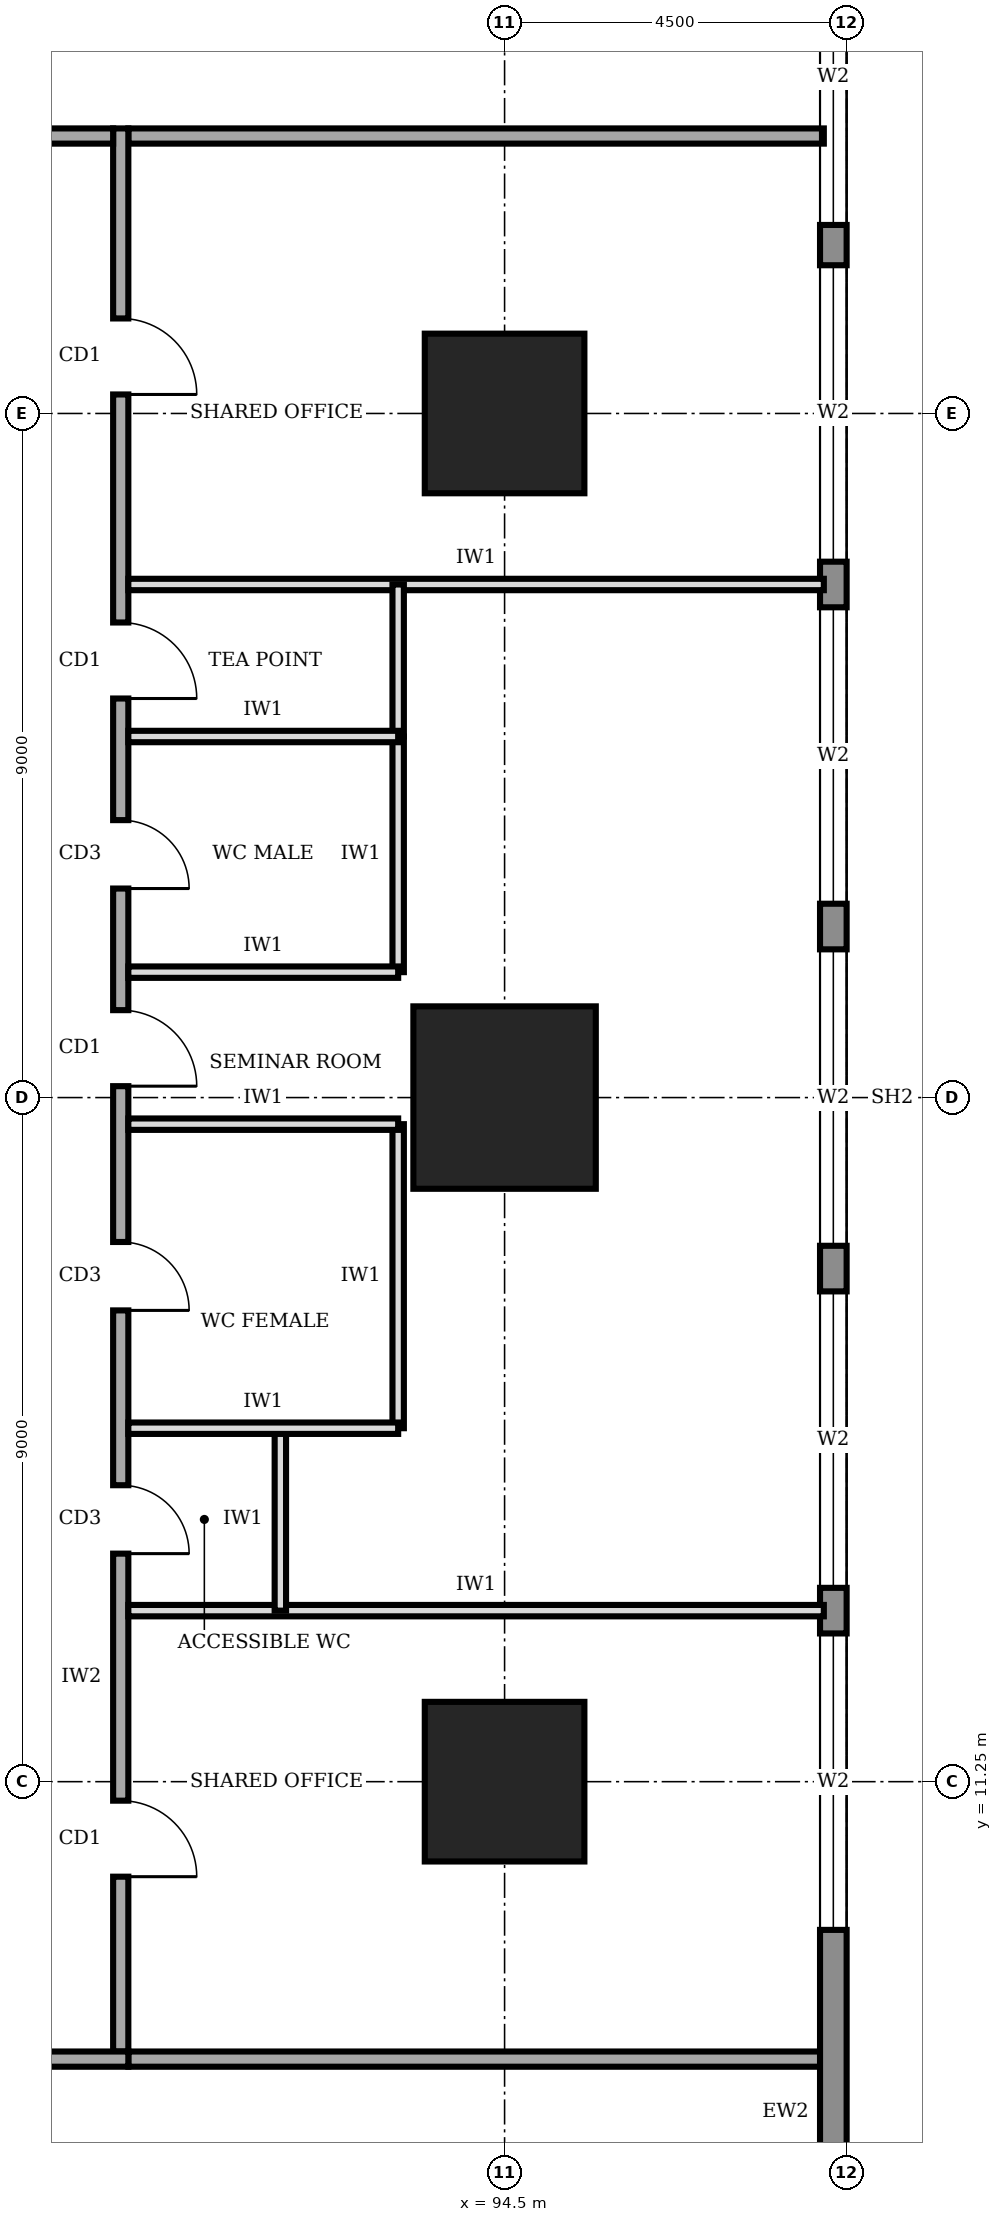
"""IFC4 building model, lengths in metres.
Left out: names, types, materials, properties, quantities, classifications, styles, units other than length and angle.
Written with IfcOpenShell. Run it as: python <this file> out.ifc"""

import sys

from ifc_helpers import new_model, si_unit, direction, frame, frame_2d, origin, origin_2d, place, context, subcontext, project, spatial, rectangle, extrude, element, fill, save


model = new_model("IFC4")
c1 = context("Model", 3, precision=1e-05, world=origin(), true_north=direction((0.0, 1.0)))
c2 = subcontext(c1, "Body", "Model", "MODEL_VIEW")
j1 = project(units=[si_unit("LENGTHUNIT", "METRE"), si_unit("PLANEANGLEUNIT", "RADIAN")], contexts=[c1])
p1 = place(None, origin())
s1 = spatial("IfcSite", under=j1, at=p1, CompositionType="ELEMENT")
p2 = place(p1, origin())
s2 = spatial("IfcBuilding", under=s1, at=p2, CompositionType="ELEMENT")
p3 = place(p2, frame((0.0, 0.0, 69.0)))
s3 = spatial("IfcBuildingStorey", under=s2, at=p3, CompositionType="ELEMENT", Elevation=69.0)
p4 = place(p3, frame((94.5, 11.25, 0.0), z_axis=(0.0, 0.0, 1.0), x_axis=(1.0, 0.0, 0.0)))
e1 = element("IfcColumn", 1, at=p4, inside=s3, PredefinedType="COLUMN", context=c2, shape_type="SweptSolid", body=[
    extrude(rectangle(XDim=2.1, YDim=2.1, at=origin_2d()), origin(), (0.0, 0.0, 1.0), 4.0),
])
p5 = place(p3, frame((94.5, 20.25, 0.0), z_axis=(0.0, 0.0, 1.0), x_axis=(1.0, 0.0, 0.0)))
e2 = element("IfcColumn", 2, at=p5, inside=s3, PredefinedType="COLUMN", context=c2, shape_type="SweptSolid", body=[
    extrude(rectangle(XDim=2.4, YDim=2.4, at=origin_2d()), origin(), (0.0, 0.0, 1.0), 4.0),
])
p6 = place(p3, frame((94.5, 29.25, 0.0), z_axis=(0.0, 0.0, 1.0), x_axis=(1.0, 0.0, 0.0)))
e3 = element("IfcColumn", 3, at=p6, inside=s3, PredefinedType="COLUMN", context=c2, shape_type="SweptSolid", body=[
    extrude(rectangle(XDim=2.1, YDim=2.1, at=origin_2d()), origin(), (0.0, 0.0, 1.0), 4.0),
])
p7 = place(p3, frame((98.825, 4.52, 0.0), z_axis=(0.0, 0.0, 1.0), x_axis=(0.0, 1.0, 0.0)))
e4 = element("IfcWall", 4, at=p7, inside=s3, PredefinedType="STANDARD", context=c2, shape_type="SweptSolid", body=[
    extrude(rectangle(XDim=31.46, YDim=0.35, at=frame_2d((15.73, 0.0))), origin(), (0.0, 0.0, 1.0), 3.75),
])
p8 = place(p7, frame((4.78, 0.0, 0.6)))
e5 = element("IfcOpeningElement", 5, at=p8, cuts=e4, PredefinedType="OPENING", context=c2, shape_type="SweptSolid", body=[
    extrude(rectangle(XDim=3.9, YDim=2.6, at=frame_2d((1.95, 1.3))), frame((0.0, 0.185, 0.0), z_axis=(0.0, -1.0, 0.0), x_axis=(1.0, 0.0, 0.0)), (0.0, 0.0, 1.0), 0.37),
])
p9 = place(p7, frame((9.28, 0.0, 0.6)))
e6 = element("IfcOpeningElement", 6, at=p9, cuts=e4, PredefinedType="OPENING", context=c2, shape_type="SweptSolid", body=[
    extrude(rectangle(XDim=3.9, YDim=2.6, at=frame_2d((1.95, 1.3))), frame((0.0, 0.185, 0.0), z_axis=(0.0, -1.0, 0.0), x_axis=(1.0, 0.0, 0.0)), (0.0, 0.0, 1.0), 0.37),
])
p10 = place(p7, frame((13.78, 0.0, 0.6)))
e7 = element("IfcOpeningElement", 7, at=p10, cuts=e4, PredefinedType="OPENING", context=c2, shape_type="SweptSolid", body=[
    extrude(rectangle(XDim=3.9, YDim=2.6, at=frame_2d((1.95, 1.3))), frame((0.0, 0.185, 0.0), z_axis=(0.0, -1.0, 0.0), x_axis=(1.0, 0.0, 0.0)), (0.0, 0.0, 1.0), 0.37),
])
p11 = place(p7, frame((18.28, 0.0, 0.6)))
e8 = element("IfcOpeningElement", 8, at=p11, cuts=e4, PredefinedType="OPENING", context=c2, shape_type="SweptSolid", body=[
    extrude(rectangle(XDim=3.9, YDim=2.6, at=frame_2d((1.95, 1.3))), frame((0.0, 0.185, 0.0), z_axis=(0.0, -1.0, 0.0), x_axis=(1.0, 0.0, 0.0)), (0.0, 0.0, 1.0), 0.37),
])
p12 = place(p7, frame((22.78, 0.0, 0.6)))
e9 = element("IfcOpeningElement", 9, at=p12, cuts=e4, PredefinedType="OPENING", context=c2, shape_type="SweptSolid", body=[
    extrude(rectangle(XDim=3.9, YDim=2.6, at=frame_2d((1.95, 1.3))), frame((0.0, 0.185, 0.0), z_axis=(0.0, -1.0, 0.0), x_axis=(1.0, 0.0, 0.0)), (0.0, 0.0, 1.0), 0.37),
])
p13 = place(p7, frame((27.21, 0.0, 0.6)))
e10 = element("IfcOpeningElement", 10, at=p13, cuts=e4, PredefinedType="OPENING", context=c2, shape_type="SweptSolid", body=[
    extrude(rectangle(XDim=3.9, YDim=2.6, at=frame_2d((1.95, 1.3))), frame((0.0, 0.185, 0.0), z_axis=(0.0, -1.0, 0.0), x_axis=(1.0, 0.0, 0.0)), (0.0, 0.0, 1.0), 0.37),
])
p14 = place(p3, frame((72.65, 7.6, 0.0), z_axis=(0.0, 0.0, 1.0), x_axis=(1.0, 0.0, 0.0)))
e11 = element("IfcWall", 11, at=p14, inside=s3, PredefinedType="SOLIDWALL", context=c2, shape_type="SweptSolid", body=[
    extrude(rectangle(XDim=16.9, YDim=0.2, at=frame_2d((8.45, 0.0))), origin(), (0.0, 0.0, 1.0), 3.75),
])
p15 = place(p14, frame((3.175, 0.0, 0.0)))
e12 = element("IfcOpeningElement", 12, at=p15, cuts=e11, PredefinedType="OPENING", context=c2, shape_type="SweptSolid", body=[
    extrude(rectangle(XDim=1.8, YDim=2.1, at=frame_2d((0.9, 1.05))), frame((0.0, 0.11, 0.0), z_axis=(0.0, -1.0, 0.0), x_axis=(1.0, 0.0, 0.0)), (0.0, 0.0, 1.0), 0.22),
])
p16 = place(p14, frame((10.1, 0.0, 0.0)))
e13 = element("IfcOpeningElement", 13, at=p16, cuts=e11, PredefinedType="OPENING", context=c2, shape_type="SweptSolid", body=[
    extrude(rectangle(XDim=1.0, YDim=2.1, at=frame_2d((0.5, 1.05))), frame((0.0, 0.11, 0.0), z_axis=(0.0, -1.0, 0.0), x_axis=(1.0, 0.0, 0.0)), (0.0, 0.0, 1.0), 0.22),
])
p17 = place(p14, frame((14.375, 0.0, 0.0)))
e14 = element("IfcOpeningElement", 14, at=p17, cuts=e11, PredefinedType="OPENING", context=c2, shape_type="SweptSolid", body=[
    extrude(rectangle(XDim=1.0, YDim=2.1, at=frame_2d((0.5, 1.05))), frame((0.0, 0.11, 0.0), z_axis=(0.0, -1.0, 0.0), x_axis=(1.0, 0.0, 0.0)), (0.0, 0.0, 1.0), 0.22),
])
p18 = place(p3, frame((89.45, 7.7, 0.0), z_axis=(0.0, 0.0, 1.0), x_axis=(0.0, 1.0, 0.0)))
e15 = element("IfcWall", 15, at=p18, inside=s3, PredefinedType="SOLIDWALL", context=c2, shape_type="SweptSolid", body=[
    extrude(rectangle(XDim=25.3, YDim=0.2, at=frame_2d((12.65, 0.0))), origin(), (0.0, 0.0, 1.0), 3.75),
])
p19 = place(p18, frame((2.3, 0.0, 0.0)))
e16 = element("IfcOpeningElement", 16, at=p19, cuts=e15, PredefinedType="OPENING", context=c2, shape_type="SweptSolid", body=[
    extrude(rectangle(XDim=1.0, YDim=2.1, at=frame_2d((0.5, 1.05))), frame((0.0, 0.11, 0.0), z_axis=(0.0, -1.0, 0.0), x_axis=(1.0, 0.0, 0.0)), (0.0, 0.0, 1.0), 0.22),
])
p20 = place(p18, frame((6.55, 0.0, 0.0)))
e17 = element("IfcOpeningElement", 17, at=p20, cuts=e15, PredefinedType="OPENING", context=c2, shape_type="SweptSolid", body=[
    extrude(rectangle(XDim=0.9, YDim=2.1, at=frame_2d((0.45, 1.05))), frame((0.0, 0.11, 0.0), z_axis=(0.0, -1.0, 0.0), x_axis=(1.0, 0.0, 0.0)), (0.0, 0.0, 1.0), 0.22),
])
p21 = place(p18, frame((9.75, 0.0, 0.0)))
e18 = element("IfcOpeningElement", 18, at=p21, cuts=e15, PredefinedType="OPENING", context=c2, shape_type="SweptSolid", body=[
    extrude(rectangle(XDim=0.9, YDim=2.1, at=frame_2d((0.45, 1.05))), frame((0.0, 0.11, 0.0), z_axis=(0.0, -1.0, 0.0), x_axis=(1.0, 0.0, 0.0)), (0.0, 0.0, 1.0), 0.22),
])
p22 = place(p18, frame((15.3, 0.0, 0.0)))
e19 = element("IfcOpeningElement", 19, at=p22, cuts=e15, PredefinedType="OPENING", context=c2, shape_type="SweptSolid", body=[
    extrude(rectangle(XDim=0.9, YDim=2.1, at=frame_2d((0.45, 1.05))), frame((0.0, 0.11, 0.0), z_axis=(0.0, -1.0, 0.0), x_axis=(1.0, 0.0, 0.0)), (0.0, 0.0, 1.0), 0.22),
])
p23 = place(p18, frame((17.8, 0.0, 0.0)))
e20 = element("IfcOpeningElement", 20, at=p23, cuts=e15, PredefinedType="OPENING", context=c2, shape_type="SweptSolid", body=[
    extrude(rectangle(XDim=1.0, YDim=2.1, at=frame_2d((0.5, 1.05))), frame((0.0, 0.11, 0.0), z_axis=(0.0, -1.0, 0.0), x_axis=(1.0, 0.0, 0.0)), (0.0, 0.0, 1.0), 0.22),
])
p24 = place(p18, frame((12.7, 0.0, 0.0)))
e21 = element("IfcOpeningElement", 21, at=p24, cuts=e15, PredefinedType="OPENING", context=c2, shape_type="SweptSolid", body=[
    extrude(rectangle(XDim=1.0, YDim=2.1, at=frame_2d((0.5, 1.05))), frame((0.0, 0.11, 0.0), z_axis=(0.0, -1.0, 0.0), x_axis=(1.0, 0.0, 0.0)), (0.0, 0.0, 1.0), 0.22),
])
p25 = place(p18, frame((21.8, 0.0, 0.0)))
e22 = element("IfcOpeningElement", 22, at=p25, cuts=e15, PredefinedType="OPENING", context=c2, shape_type="SweptSolid", body=[
    extrude(rectangle(XDim=1.0, YDim=2.1, at=frame_2d((0.5, 1.05))), frame((0.0, 0.11, 0.0), z_axis=(0.0, -1.0, 0.0), x_axis=(1.0, 0.0, 0.0)), (0.0, 0.0, 1.0), 0.22),
])
p26 = place(p3, frame((89.35, 32.9, 0.0), z_axis=(0.0, 0.0, 1.0), x_axis=(-1.0, 0.0, 0.0)))
e23 = element("IfcWall", 23, at=p26, inside=s3, PredefinedType="SOLIDWALL", context=c2, shape_type="SweptSolid", body=[
    extrude(rectangle(XDim=16.9, YDim=0.2, at=frame_2d((8.45, 0.0))), origin(), (0.0, 0.0, 1.0), 3.75),
])
p27 = place(p26, frame((14.375, 0.0, 0.0)))
e24 = element("IfcOpeningElement", 24, at=p27, cuts=e23, PredefinedType="OPENING", context=c2, shape_type="SweptSolid", body=[
    extrude(rectangle(XDim=1.0, YDim=2.1, at=frame_2d((0.5, 1.05))), frame((0.0, 0.11, 0.0), z_axis=(0.0, -1.0, 0.0), x_axis=(1.0, 0.0, 0.0)), (0.0, 0.0, 1.0), 0.22),
])
p28 = place(p26, frame((7.85, 0.0, 0.0)))
e25 = element("IfcOpeningElement", 25, at=p28, cuts=e23, PredefinedType="OPENING", context=c2, shape_type="SweptSolid", body=[
    extrude(rectangle(XDim=1.0, YDim=2.1, at=frame_2d((0.5, 1.05))), frame((0.0, 0.11, 0.0), z_axis=(0.0, -1.0, 0.0), x_axis=(1.0, 0.0, 0.0)), (0.0, 0.0, 1.0), 0.22),
])
p29 = place(p26, frame((1.325, 0.0, 0.0)))
e26 = element("IfcOpeningElement", 26, at=p29, cuts=e23, PredefinedType="OPENING", context=c2, shape_type="SweptSolid", body=[
    extrude(rectangle(XDim=1.0, YDim=2.1, at=frame_2d((0.5, 1.05))), frame((0.0, 0.11, 0.0), z_axis=(0.0, -1.0, 0.0), x_axis=(1.0, 0.0, 0.0)), (0.0, 0.0, 1.0), 0.22),
])
for number, where, z_axis, x_axis in (
    (27, (89.55, 7.6, 0.0), (0.0, 0.0, 1.0), (1.0, 0.0, 0.0)),
    (28, (89.55, 32.9, 0.0), (0.0, 0.0, 1.0), (1.0, 0.0, 0.0)),
):
    element("IfcWall", number, at=place(p3, frame(where, z_axis=z_axis, x_axis=x_axis)), inside=s3, PredefinedType="SOLIDWALL", context=c2, shape_type="SweptSolid", body=[
        extrude(rectangle(XDim=9.15, YDim=0.2, at=frame_2d((4.575, 0.0))), origin(), (0.0, 0.0, 1.0), 3.75),
    ])
for number, where, z_axis, x_axis in (
    (29, (89.55, 13.5, 0.0), (0.0, 0.0, 1.0), (1.0, 0.0, 0.0)),
    (30, (89.55, 27.0, 0.0), (0.0, 0.0, 1.0), (1.0, 0.0, 0.0)),
):
    element("IfcWall", number, at=place(p3, frame(where, z_axis=z_axis, x_axis=x_axis)), inside=s3, PredefinedType="PARTITIONING", context=c2, shape_type="SweptSolid", body=[
        extrude(rectangle(XDim=9.15, YDim=0.15, at=frame_2d((4.575, 0.0))), origin(), (0.0, 0.0, 1.0), 3.75),
    ])
p30 = place(p3, frame((89.55, 15.9, 0.0), z_axis=(0.0, 0.0, 1.0), x_axis=(1.0, 0.0, 0.0)))
e31 = element("IfcWall", 31, at=p30, inside=s3, PredefinedType="PARTITIONING", context=c2, shape_type="SweptSolid", body=[
    extrude(rectangle(XDim=3.55, YDim=0.15, at=frame_2d((1.775, 0.0))), origin(), (0.0, 0.0, 1.0), 3.75),
])
p31 = place(p3, frame((89.55, 19.9, 0.0), z_axis=(0.0, 0.0, 1.0), x_axis=(1.0, 0.0, 0.0)))
e32 = element("IfcWall", 32, at=p31, inside=s3, PredefinedType="PARTITIONING", context=c2, shape_type="SweptSolid", body=[
    extrude(rectangle(XDim=3.55, YDim=0.15, at=frame_2d((1.775, 0.0))), origin(), (0.0, 0.0, 1.0), 2.85),
])
for number, where, z_axis, x_axis in (
    (33, (89.55, 21.9, 0.0), (0.0, 0.0, 1.0), (1.0, 0.0, 0.0)),
    (34, (89.55, 25.0, 0.0), (0.0, 0.0, 1.0), (1.0, 0.0, 0.0)),
):
    element("IfcWall", number, at=place(p3, frame(where, z_axis=z_axis, x_axis=x_axis)), inside=s3, PredefinedType="PARTITIONING", context=c2, shape_type="SweptSolid", body=[
        extrude(rectangle(XDim=3.55, YDim=0.15, at=frame_2d((1.775, 0.0))), origin(), (0.0, 0.0, 1.0), 3.75),
    ])
p32 = place(p3, frame((91.55, 13.5, 0.0), z_axis=(0.0, 0.0, 1.0), x_axis=(0.0, 1.0, 0.0)))
e35 = element("IfcWall", 35, at=p32, inside=s3, PredefinedType="PARTITIONING", context=c2, shape_type="SweptSolid", body=[
    extrude(rectangle(XDim=2.4, YDim=0.15, at=frame_2d((1.2, 0.0))), origin(), (0.0, 0.0, 1.0), 3.75),
])
p33 = place(p3, frame((93.1, 15.9, 0.0), z_axis=(0.0, 0.0, 1.0), x_axis=(0.0, 1.0, 0.0)))
e36 = element("IfcWall", 36, at=p33, inside=s3, PredefinedType="PARTITIONING", context=c2, shape_type="SweptSolid", body=[
    extrude(rectangle(XDim=4.0, YDim=0.15, at=frame_2d((2.0, 0.0))), origin(), (0.0, 0.0, 1.0), 3.75),
])
p34 = place(p3, frame((93.1, 21.9, 0.0), z_axis=(0.0, 0.0, 1.0), x_axis=(0.0, 1.0, 0.0)))
e37 = element("IfcWall", 37, at=p34, inside=s3, PredefinedType="PARTITIONING", context=c2, shape_type="SweptSolid", body=[
    extrude(rectangle(XDim=3.1, YDim=0.15, at=frame_2d((1.55, 0.0))), origin(), (0.0, 0.0, 1.0), 3.75),
])
p35 = place(p3, frame((93.1, 25.0, 0.0), z_axis=(0.0, 0.0, 1.0), x_axis=(0.0, 1.0, 0.0)))
e38 = element("IfcWall", 38, at=p35, inside=s3, PredefinedType="PARTITIONING", context=c2, shape_type="SweptSolid", body=[
    extrude(rectangle(XDim=2.0, YDim=0.15, at=frame_2d((1.0, 0.0))), origin(), (0.0, 0.0, 1.0), 3.75),
])
p36 = place(p8, origin())
e39 = element("IfcWindow", 39, at=p36, inside=s3, PartitioningType="SINGLE_PANEL", PredefinedType="WINDOW", context=c2, shape_type="SweptSolid", body=[
    extrude(rectangle(XDim=3.9, YDim=2.6, at=frame_2d((1.95, 1.3))), frame((0.0, 0.03, 0.0), z_axis=(0.0, -1.0, 0.0), x_axis=(1.0, 0.0, 0.0)), (0.0, 0.0, 1.0), 0.06),
])
fill(e5, e39)
p37 = place(p9, origin())
e40 = element("IfcWindow", 40, at=p37, inside=s3, PartitioningType="SINGLE_PANEL", PredefinedType="WINDOW", context=c2, shape_type="SweptSolid", body=[
    extrude(rectangle(XDim=3.9, YDim=2.6, at=frame_2d((1.95, 1.3))), frame((0.0, 0.03, 0.0), z_axis=(0.0, -1.0, 0.0), x_axis=(1.0, 0.0, 0.0)), (0.0, 0.0, 1.0), 0.06),
])
fill(e6, e40)
p38 = place(p10, origin())
e41 = element("IfcWindow", 41, at=p38, inside=s3, PartitioningType="SINGLE_PANEL", PredefinedType="WINDOW", context=c2, shape_type="SweptSolid", body=[
    extrude(rectangle(XDim=3.9, YDim=2.6, at=frame_2d((1.95, 1.3))), frame((0.0, 0.03, 0.0), z_axis=(0.0, -1.0, 0.0), x_axis=(1.0, 0.0, 0.0)), (0.0, 0.0, 1.0), 0.06),
])
fill(e7, e41)
p39 = place(p11, origin())
e42 = element("IfcWindow", 42, at=p39, inside=s3, PartitioningType="SINGLE_PANEL", PredefinedType="WINDOW", context=c2, shape_type="SweptSolid", body=[
    extrude(rectangle(XDim=3.9, YDim=2.6, at=frame_2d((1.95, 1.3))), frame((0.0, 0.03, 0.0), z_axis=(0.0, -1.0, 0.0), x_axis=(1.0, 0.0, 0.0)), (0.0, 0.0, 1.0), 0.06),
])
fill(e8, e42)
p40 = place(p12, origin())
e43 = element("IfcWindow", 43, at=p40, inside=s3, PartitioningType="SINGLE_PANEL", PredefinedType="WINDOW", context=c2, shape_type="SweptSolid", body=[
    extrude(rectangle(XDim=3.9, YDim=2.6, at=frame_2d((1.95, 1.3))), frame((0.0, 0.03, 0.0), z_axis=(0.0, -1.0, 0.0), x_axis=(1.0, 0.0, 0.0)), (0.0, 0.0, 1.0), 0.06),
])
fill(e9, e43)
p41 = place(p13, origin())
e44 = element("IfcWindow", 44, at=p41, inside=s3, PartitioningType="SINGLE_PANEL", PredefinedType="WINDOW", context=c2, shape_type="SweptSolid", body=[
    extrude(rectangle(XDim=3.9, YDim=2.6, at=frame_2d((1.95, 1.3))), frame((0.0, 0.03, 0.0), z_axis=(0.0, -1.0, 0.0), x_axis=(1.0, 0.0, 0.0)), (0.0, 0.0, 1.0), 0.06),
])
fill(e10, e44)
p42 = place(p19, frame((1.0, 0.0, 0.0), z_axis=(0.0, 0.0, 1.0), x_axis=(-1.0, 0.0, 0.0)))
e45 = element("IfcDoor", 45, at=p42, inside=s3, OperationType="SINGLE_SWING_RIGHT", PredefinedType="DOOR", context=c2, shape_type="SweptSolid", body=[
    extrude(rectangle(XDim=1.0, YDim=2.1, at=frame_2d((0.5, 1.05))), frame((0.0, 0.025, 0.0), z_axis=(0.0, -1.0, 0.0), x_axis=(1.0, 0.0, 0.0)), (0.0, 0.0, 1.0), 0.05),
])
fill(e16, e45)
p43 = place(p20, frame((0.9, 0.0, 0.0), z_axis=(0.0, 0.0, 1.0), x_axis=(-1.0, 0.0, 0.0)))
e46 = element("IfcDoor", 46, at=p43, inside=s3, OperationType="SINGLE_SWING_RIGHT", PredefinedType="DOOR", context=c2, shape_type="SweptSolid", body=[
    extrude(rectangle(XDim=0.9, YDim=2.1, at=frame_2d((0.45, 1.05))), frame((0.0, 0.025, 0.0), z_axis=(0.0, -1.0, 0.0), x_axis=(1.0, 0.0, 0.0)), (0.0, 0.0, 1.0), 0.05),
])
fill(e17, e46)
p44 = place(p21, frame((0.9, 0.0, 0.0), z_axis=(0.0, 0.0, 1.0), x_axis=(-1.0, 0.0, 0.0)))
e47 = element("IfcDoor", 47, at=p44, inside=s3, OperationType="SINGLE_SWING_RIGHT", PredefinedType="DOOR", context=c2, shape_type="SweptSolid", body=[
    extrude(rectangle(XDim=0.9, YDim=2.1, at=frame_2d((0.45, 1.05))), frame((0.0, 0.025, 0.0), z_axis=(0.0, -1.0, 0.0), x_axis=(1.0, 0.0, 0.0)), (0.0, 0.0, 1.0), 0.05),
])
fill(e18, e47)
p45 = place(p22, frame((0.9, 0.0, 0.0), z_axis=(0.0, 0.0, 1.0), x_axis=(-1.0, 0.0, 0.0)))
e48 = element("IfcDoor", 48, at=p45, inside=s3, OperationType="SINGLE_SWING_RIGHT", PredefinedType="DOOR", context=c2, shape_type="SweptSolid", body=[
    extrude(rectangle(XDim=0.9, YDim=2.1, at=frame_2d((0.45, 1.05))), frame((0.0, 0.025, 0.0), z_axis=(0.0, -1.0, 0.0), x_axis=(1.0, 0.0, 0.0)), (0.0, 0.0, 1.0), 0.05),
])
fill(e19, e48)
p46 = place(p23, frame((1.0, 0.0, 0.0), z_axis=(0.0, 0.0, 1.0), x_axis=(-1.0, 0.0, 0.0)))
e49 = element("IfcDoor", 49, at=p46, inside=s3, OperationType="SINGLE_SWING_RIGHT", PredefinedType="DOOR", context=c2, shape_type="SweptSolid", body=[
    extrude(rectangle(XDim=1.0, YDim=2.1, at=frame_2d((0.5, 1.05))), frame((0.0, 0.025, 0.0), z_axis=(0.0, -1.0, 0.0), x_axis=(1.0, 0.0, 0.0)), (0.0, 0.0, 1.0), 0.05),
])
fill(e20, e49)
p47 = place(p24, frame((1.0, 0.0, 0.0), z_axis=(0.0, 0.0, 1.0), x_axis=(-1.0, 0.0, 0.0)))
e50 = element("IfcDoor", 50, at=p47, inside=s3, OperationType="SINGLE_SWING_RIGHT", PredefinedType="DOOR", context=c2, shape_type="SweptSolid", body=[
    extrude(rectangle(XDim=1.0, YDim=2.1, at=frame_2d((0.5, 1.05))), frame((0.0, 0.025, 0.0), z_axis=(0.0, -1.0, 0.0), x_axis=(1.0, 0.0, 0.0)), (0.0, 0.0, 1.0), 0.05),
])
fill(e21, e50)
p48 = place(p25, frame((1.0, 0.0, 0.0), z_axis=(0.0, 0.0, 1.0), x_axis=(-1.0, 0.0, 0.0)))
e51 = element("IfcDoor", 51, at=p48, inside=s3, OperationType="SINGLE_SWING_RIGHT", PredefinedType="DOOR", context=c2, shape_type="SweptSolid", body=[
    extrude(rectangle(XDim=1.0, YDim=2.1, at=frame_2d((0.5, 1.05))), frame((0.0, 0.025, 0.0), z_axis=(0.0, -1.0, 0.0), x_axis=(1.0, 0.0, 0.0)), (0.0, 0.0, 1.0), 0.05),
])
fill(e22, e51)
save(model, sys.argv[1])
